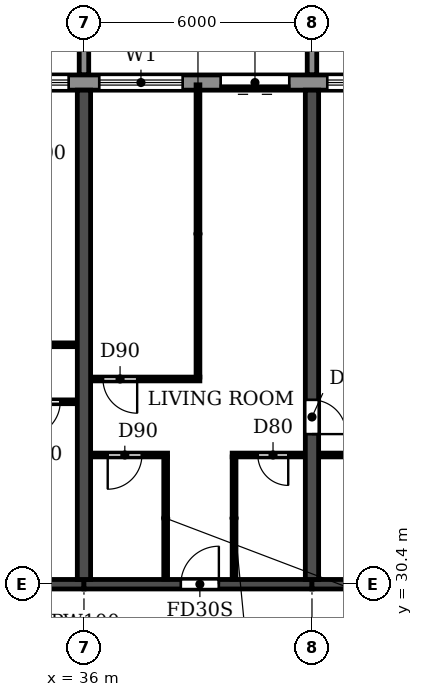
"""IFC4 building model, lengths in metres.
Left out: names, types, materials, properties, quantities, classifications, styles, units other than length and angle.
Written with IfcOpenShell. Run it as: python <this file> out.ifc"""

import sys

from ifc_helpers import new_model, si_unit, direction, frame, frame_2d, origin, place, context, subcontext, project, spatial, polyline, rectangle, outline, extrude, source, transform, mapped, element, fill, save


model = new_model("IFC4")
c1 = context("Model", 3, precision=1e-05, world=origin(), true_north=direction((0.0, 1.0)))
c2 = subcontext(c1, "Body", "Model", "MODEL_VIEW")
j1 = project(units=[si_unit("LENGTHUNIT", "METRE"), si_unit("PLANEANGLEUNIT", "RADIAN")], contexts=[c1])
p1 = place(None, origin())
s1 = spatial("IfcSite", under=j1, at=p1, CompositionType="ELEMENT")
p2 = place(p1, origin())
s2 = spatial("IfcBuilding", under=s1, at=p2, CompositionType="ELEMENT")
p3 = place(p2, frame((0.0, 0.0, 82.8)))
s3 = spatial("IfcBuildingStorey", under=s2, at=p3, CompositionType="ELEMENT", Elevation=82.8)
p4 = place(p3, frame((36.0, 30.525, 0.0), z_axis=(0.0, 0.0, 1.0), x_axis=(0.0, 1.0, 0.0)))
e1 = element("IfcWall", 1, at=p4, inside=s3, PredefinedType="SHEAR", context=c2, shape_type="SweptSolid", body=[
    extrude(rectangle(XDim=12.875, YDim=0.35, at=frame_2d((6.438, 0.0))), origin(), (0.0, 0.0, 1.0), 3.06),
])
p5 = place(p3, frame((42.0, 30.525, 0.0), z_axis=(0.0, 0.0, 1.0), x_axis=(0.0, 1.0, 0.0)))
e2 = element("IfcWall", 2, at=p5, inside=s3, PredefinedType="SHEAR", context=c2, shape_type="SweptSolid", body=[
    extrude(rectangle(XDim=12.875, YDim=0.35, at=frame_2d((6.438, 0.0))), origin(), (0.0, 0.0, 1.0), 3.06),
])
p6 = place(p5, frame((3.825, 0.0, 0.0)))
e3 = element("IfcOpeningElement", 3, at=p6, cuts=e2, PredefinedType="OPENING", context=c2, shape_type="SweptSolid", body=[
    extrude(rectangle(XDim=0.9, YDim=2.1, at=frame_2d((0.45, 1.05))), frame((0.0, 0.185, 0.0), z_axis=(0.0, -1.0, 0.0), x_axis=(1.0, 0.0, 0.0)), (0.0, 0.0, 1.0), 0.37),
])
p7 = place(p3, frame((30.0, 30.4, 0.0), z_axis=(0.0, 0.0, 1.0), x_axis=(1.0, 0.0, 0.0)))
e4 = element("IfcWall", 4, at=p7, inside=s3, PredefinedType="SHEAR", context=c2, shape_type="SweptSolid", body=[
    extrude(rectangle(XDim=6.0, YDim=0.25, at=frame_2d((3.0, 0.0))), origin(), (0.0, 0.0, 1.0), 2.46),
])
p8 = place(p7, frame((2.45, 0.0, 0.0)))
e5 = element("IfcOpeningElement", 5, at=p8, cuts=e4, PredefinedType="OPENING", context=c2, shape_type="SweptSolid", body=[
    extrude(rectangle(XDim=1.0, YDim=2.1, at=frame_2d((0.5, 1.05))), frame((0.0, 0.135, 0.0), z_axis=(0.0, -1.0, 0.0), x_axis=(1.0, 0.0, 0.0)), (0.0, 0.0, 1.0), 0.27),
])
p9 = place(p3, frame((36.0, 30.4, 0.0), z_axis=(0.0, 0.0, 1.0), x_axis=(1.0, 0.0, 0.0)))
e6 = element("IfcWall", 6, at=p9, inside=s3, PredefinedType="SHEAR", context=c2, shape_type="SweptSolid", body=[
    extrude(rectangle(XDim=6.0, YDim=0.25, at=frame_2d((3.0, 0.0))), origin(), (0.0, 0.0, 1.0), 2.46),
])
p10 = place(p9, frame((2.55, 0.0, 0.0)))
e7 = element("IfcOpeningElement", 7, at=p10, cuts=e6, PredefinedType="OPENING", context=c2, shape_type="SweptSolid", body=[
    extrude(rectangle(XDim=1.0, YDim=2.1, at=frame_2d((0.5, 1.05))), frame((0.0, 0.135, 0.0), z_axis=(0.0, -1.0, 0.0), x_axis=(1.0, 0.0, 0.0)), (0.0, 0.0, 1.0), 0.27),
])
p11 = place(p3, frame((42.0, 30.4, 0.0), z_axis=(0.0, 0.0, 1.0), x_axis=(1.0, 0.0, 0.0)))
e8 = element("IfcWall", 8, at=p11, inside=s3, PredefinedType="SHEAR", context=c2, shape_type="SweptSolid", body=[
    extrude(rectangle(XDim=6.0, YDim=0.25, at=frame_2d((3.0, 0.0))), origin(), (0.0, 0.0, 1.0), 2.46),
])
p12 = place(p3, frame((91.317, 43.6, 0.0), z_axis=(0.0, 0.0, 1.0), x_axis=(-1.0, 0.0, 0.0)))
e9 = element("IfcWall", 9, at=p12, inside=s3, PredefinedType="STANDARD", context=c2, shape_type="SweptSolid", body=[
    extrude(rectangle(XDim=80.634, YDim=0.4, at=frame_2d((40.317, 0.0))), origin(), (0.0, 0.0, 1.0), 3.06),
])
p13 = place(p12, frame((76.717, 0.0, 0.9)))
e10 = element("IfcOpeningElement", 10, at=p13, cuts=e9, PredefinedType="OPENING", context=c2, shape_type="SweptSolid", body=[
    extrude(rectangle(XDim=2.2, YDim=1.5, at=frame_2d((1.1, 0.75))), frame((0.0, 0.21, 0.0), z_axis=(0.0, -1.0, 0.0), x_axis=(1.0, 0.0, 0.0)), (0.0, 0.0, 1.0), 0.42),
])
p14 = place(p12, frame((73.917, 0.0, 0.0)))
e11 = element("IfcOpeningElement", 11, at=p14, cuts=e9, PredefinedType="OPENING", context=c2, shape_type="SweptSolid", body=[
    extrude(rectangle(XDim=1.8, YDim=2.4, at=frame_2d((0.9, 1.2))), frame((0.0, 0.21, 0.0), z_axis=(0.0, -1.0, 0.0), x_axis=(1.0, 0.0, 0.0)), (0.0, 0.0, 1.0), 0.42),
])
p15 = place(p12, frame((70.717, 0.0, 0.9)))
e12 = element("IfcOpeningElement", 12, at=p15, cuts=e9, PredefinedType="OPENING", context=c2, shape_type="SweptSolid", body=[
    extrude(rectangle(XDim=2.2, YDim=1.5, at=frame_2d((1.1, 0.75))), frame((0.0, 0.21, 0.0), z_axis=(0.0, -1.0, 0.0), x_axis=(1.0, 0.0, 0.0)), (0.0, 0.0, 1.0), 0.42),
])
p16 = place(p12, frame((67.717, 0.0, 0.9)))
e13 = element("IfcOpeningElement", 13, at=p16, cuts=e9, PredefinedType="OPENING", context=c2, shape_type="SweptSolid", body=[
    extrude(rectangle(XDim=2.2, YDim=1.5, at=frame_2d((1.1, 0.75))), frame((0.0, 0.21, 0.0), z_axis=(0.0, -1.0, 0.0), x_axis=(1.0, 0.0, 0.0)), (0.0, 0.0, 1.0), 0.42),
])
p17 = place(p12, frame((64.717, 0.0, 0.9)))
e14 = element("IfcOpeningElement", 14, at=p17, cuts=e9, PredefinedType="OPENING", context=c2, shape_type="SweptSolid", body=[
    extrude(rectangle(XDim=2.2, YDim=1.5, at=frame_2d((1.1, 0.75))), frame((0.0, 0.21, 0.0), z_axis=(0.0, -1.0, 0.0), x_axis=(1.0, 0.0, 0.0)), (0.0, 0.0, 1.0), 0.42),
])
p18 = place(p12, frame((61.917, 0.0, 0.0)))
e15 = element("IfcOpeningElement", 15, at=p18, cuts=e9, PredefinedType="OPENING", context=c2, shape_type="SweptSolid", body=[
    extrude(rectangle(XDim=1.8, YDim=2.4, at=frame_2d((0.9, 1.2))), frame((0.0, 0.21, 0.0), z_axis=(0.0, -1.0, 0.0), x_axis=(1.0, 0.0, 0.0)), (0.0, 0.0, 1.0), 0.42),
])
p19 = place(p12, frame((58.917, 0.0, 0.0)))
e16 = element("IfcOpeningElement", 16, at=p19, cuts=e9, PredefinedType="OPENING", context=c2, shape_type="SweptSolid", body=[
    extrude(rectangle(XDim=1.8, YDim=2.4, at=frame_2d((0.9, 1.2))), frame((0.0, 0.21, 0.0), z_axis=(0.0, -1.0, 0.0), x_axis=(1.0, 0.0, 0.0)), (0.0, 0.0, 1.0), 0.42),
])
p20 = place(p12, frame((55.717, 0.0, 0.9)))
e17 = element("IfcOpeningElement", 17, at=p20, cuts=e9, PredefinedType="OPENING", context=c2, shape_type="SweptSolid", body=[
    extrude(rectangle(XDim=2.2, YDim=1.5, at=frame_2d((1.1, 0.75))), frame((0.0, 0.21, 0.0), z_axis=(0.0, -1.0, 0.0), x_axis=(1.0, 0.0, 0.0)), (0.0, 0.0, 1.0), 0.42),
])
p21 = place(p12, frame((52.717, 0.0, 0.9)))
e18 = element("IfcOpeningElement", 18, at=p21, cuts=e9, PredefinedType="OPENING", context=c2, shape_type="SweptSolid", body=[
    extrude(rectangle(XDim=2.2, YDim=1.5, at=frame_2d((1.1, 0.75))), frame((0.0, 0.21, 0.0), z_axis=(0.0, -1.0, 0.0), x_axis=(1.0, 0.0, 0.0)), (0.0, 0.0, 1.0), 0.42),
])
p22 = place(p12, frame((49.917, 0.0, 0.0)))
e19 = element("IfcOpeningElement", 19, at=p22, cuts=e9, PredefinedType="OPENING", context=c2, shape_type="SweptSolid", body=[
    extrude(rectangle(XDim=1.8, YDim=2.4, at=frame_2d((0.9, 1.2))), frame((0.0, 0.21, 0.0), z_axis=(0.0, -1.0, 0.0), x_axis=(1.0, 0.0, 0.0)), (0.0, 0.0, 1.0), 0.42),
])
p23 = place(p12, frame((46.717, 0.0, 0.9)))
e20 = element("IfcOpeningElement", 20, at=p23, cuts=e9, PredefinedType="OPENING", context=c2, shape_type="SweptSolid", body=[
    extrude(rectangle(XDim=2.2, YDim=1.5, at=frame_2d((1.1, 0.75))), frame((0.0, 0.21, 0.0), z_axis=(0.0, -1.0, 0.0), x_axis=(1.0, 0.0, 0.0)), (0.0, 0.0, 1.0), 0.42),
])
p24 = place(p12, frame((43.717, 0.0, 0.9)))
e21 = element("IfcOpeningElement", 21, at=p24, cuts=e9, PredefinedType="OPENING", context=c2, shape_type="SweptSolid", body=[
    extrude(rectangle(XDim=2.2, YDim=1.5, at=frame_2d((1.1, 0.75))), frame((0.0, 0.21, 0.0), z_axis=(0.0, -1.0, 0.0), x_axis=(1.0, 0.0, 0.0)), (0.0, 0.0, 1.0), 0.42),
])
p25 = place(p12, frame((40.717, 0.0, 0.9)))
e22 = element("IfcOpeningElement", 22, at=p25, cuts=e9, PredefinedType="OPENING", context=c2, shape_type="SweptSolid", body=[
    extrude(rectangle(XDim=2.2, YDim=1.5, at=frame_2d((1.1, 0.75))), frame((0.0, 0.21, 0.0), z_axis=(0.0, -1.0, 0.0), x_axis=(1.0, 0.0, 0.0)), (0.0, 0.0, 1.0), 0.42),
])
p26 = place(p12, frame((37.917, 0.0, 0.0)))
e23 = element("IfcOpeningElement", 23, at=p26, cuts=e9, PredefinedType="OPENING", context=c2, shape_type="SweptSolid", body=[
    extrude(rectangle(XDim=1.8, YDim=2.4, at=frame_2d((0.9, 1.2))), frame((0.0, 0.21, 0.0), z_axis=(0.0, -1.0, 0.0), x_axis=(1.0, 0.0, 0.0)), (0.0, 0.0, 1.0), 0.42),
])
p27 = place(p12, frame((34.717, 0.0, 0.9)))
e24 = element("IfcOpeningElement", 24, at=p27, cuts=e9, PredefinedType="OPENING", context=c2, shape_type="SweptSolid", body=[
    extrude(rectangle(XDim=2.2, YDim=1.5, at=frame_2d((1.1, 0.75))), frame((0.0, 0.21, 0.0), z_axis=(0.0, -1.0, 0.0), x_axis=(1.0, 0.0, 0.0)), (0.0, 0.0, 1.0), 0.42),
])
p28 = place(p12, frame((31.717, 0.0, 0.9)))
e25 = element("IfcOpeningElement", 25, at=p28, cuts=e9, PredefinedType="OPENING", context=c2, shape_type="SweptSolid", body=[
    extrude(rectangle(XDim=2.2, YDim=1.5, at=frame_2d((1.1, 0.75))), frame((0.0, 0.21, 0.0), z_axis=(0.0, -1.0, 0.0), x_axis=(1.0, 0.0, 0.0)), (0.0, 0.0, 1.0), 0.42),
])
p29 = place(p12, frame((28.917, 0.0, 0.0)))
e26 = element("IfcOpeningElement", 26, at=p29, cuts=e9, PredefinedType="OPENING", context=c2, shape_type="SweptSolid", body=[
    extrude(rectangle(XDim=1.8, YDim=2.4, at=frame_2d((0.9, 1.2))), frame((0.0, 0.21, 0.0), z_axis=(0.0, -1.0, 0.0), x_axis=(1.0, 0.0, 0.0)), (0.0, 0.0, 1.0), 0.42),
])
p30 = place(p12, frame((25.717, 0.0, 0.9)))
e27 = element("IfcOpeningElement", 27, at=p30, cuts=e9, PredefinedType="OPENING", context=c2, shape_type="SweptSolid", body=[
    extrude(rectangle(XDim=2.2, YDim=1.5, at=frame_2d((1.1, 0.75))), frame((0.0, 0.21, 0.0), z_axis=(0.0, -1.0, 0.0), x_axis=(1.0, 0.0, 0.0)), (0.0, 0.0, 1.0), 0.42),
])
p31 = place(p12, frame((22.717, 0.0, 0.9)))
e28 = element("IfcOpeningElement", 28, at=p31, cuts=e9, PredefinedType="OPENING", context=c2, shape_type="SweptSolid", body=[
    extrude(rectangle(XDim=2.2, YDim=1.5, at=frame_2d((1.1, 0.75))), frame((0.0, 0.21, 0.0), z_axis=(0.0, -1.0, 0.0), x_axis=(1.0, 0.0, 0.0)), (0.0, 0.0, 1.0), 0.42),
])
p32 = place(p12, frame((19.717, 0.0, 0.9)))
e29 = element("IfcOpeningElement", 29, at=p32, cuts=e9, PredefinedType="OPENING", context=c2, shape_type="SweptSolid", body=[
    extrude(rectangle(XDim=2.2, YDim=1.5, at=frame_2d((1.1, 0.75))), frame((0.0, 0.21, 0.0), z_axis=(0.0, -1.0, 0.0), x_axis=(1.0, 0.0, 0.0)), (0.0, 0.0, 1.0), 0.42),
])
p33 = place(p12, frame((16.717, 0.0, 0.9)))
e30 = element("IfcOpeningElement", 30, at=p33, cuts=e9, PredefinedType="OPENING", context=c2, shape_type="SweptSolid", body=[
    extrude(rectangle(XDim=2.2, YDim=1.5, at=frame_2d((1.1, 0.75))), frame((0.0, 0.21, 0.0), z_axis=(0.0, -1.0, 0.0), x_axis=(1.0, 0.0, 0.0)), (0.0, 0.0, 1.0), 0.42),
])
p34 = place(p12, frame((13.917, 0.0, 0.0)))
e31 = element("IfcOpeningElement", 31, at=p34, cuts=e9, PredefinedType="OPENING", context=c2, shape_type="SweptSolid", body=[
    extrude(rectangle(XDim=1.8, YDim=2.4, at=frame_2d((0.9, 1.2))), frame((0.0, 0.21, 0.0), z_axis=(0.0, -1.0, 0.0), x_axis=(1.0, 0.0, 0.0)), (0.0, 0.0, 1.0), 0.42),
])
p35 = place(p12, frame((10.717, 0.0, 0.9)))
e32 = element("IfcOpeningElement", 32, at=p35, cuts=e9, PredefinedType="OPENING", context=c2, shape_type="SweptSolid", body=[
    extrude(rectangle(XDim=2.2, YDim=1.5, at=frame_2d((1.1, 0.75))), frame((0.0, 0.21, 0.0), z_axis=(0.0, -1.0, 0.0), x_axis=(1.0, 0.0, 0.0)), (0.0, 0.0, 1.0), 0.42),
])
p36 = place(p12, frame((7.717, 0.0, 0.9)))
e33 = element("IfcOpeningElement", 33, at=p36, cuts=e9, PredefinedType="OPENING", context=c2, shape_type="SweptSolid", body=[
    extrude(rectangle(XDim=2.2, YDim=1.5, at=frame_2d((1.1, 0.75))), frame((0.0, 0.21, 0.0), z_axis=(0.0, -1.0, 0.0), x_axis=(1.0, 0.0, 0.0)), (0.0, 0.0, 1.0), 0.42),
])
p37 = place(p12, frame((4.917, 0.0, 0.0)))
e34 = element("IfcOpeningElement", 34, at=p37, cuts=e9, PredefinedType="OPENING", context=c2, shape_type="SweptSolid", body=[
    extrude(rectangle(XDim=1.8, YDim=2.4, at=frame_2d((0.9, 1.2))), frame((0.0, 0.21, 0.0), z_axis=(0.0, -1.0, 0.0), x_axis=(1.0, 0.0, 0.0)), (0.0, 0.0, 1.0), 0.42),
])
p38 = place(p12, frame((1.717, 0.0, 0.9)))
e35 = element("IfcOpeningElement", 35, at=p38, cuts=e9, PredefinedType="OPENING", context=c2, shape_type="SweptSolid", body=[
    extrude(rectangle(XDim=2.2, YDim=1.5, at=frame_2d((1.1, 0.75))), frame((0.0, 0.21, 0.0), z_axis=(0.0, -1.0, 0.0), x_axis=(1.0, 0.0, 0.0)), (0.0, 0.0, 1.0), 0.42),
])
m1 = source(origin(), c2, "Body", "SweptSolid", [
    extrude(outline(polyline([(0.0, 0.0), (0.25, 0.0), (0.25, 3.1), (0.0, 3.1), (0.0, 0.0)])), origin(), (0.0, 0.0, 1.0), 3.1),
])
for number, where in (
    (36, (35.875, 43.8, 0.0)),
    (37, (41.875, 43.8, 0.0)),
):
    element("IfcWall", number, at=place(p3, frame(where)), inside=s3, PredefinedType="STANDARD", context=c2, shape_type="MappedRepresentation", body=[
        mapped(m1, transform((0.0, 0.0, 0.0))),
    ])
p39 = place(p3, frame((36.185, 33.8, 0.0), z_axis=(0.0, 0.0, 1.0), x_axis=(1.0, 0.0, 0.0)))
e38 = element("IfcWall", 38, at=p39, inside=s3, PredefinedType="PARTITIONING", context=c2, shape_type="SweptSolid", body=[
    extrude(rectangle(XDim=2.015, YDim=0.1, at=frame_2d((1.007, 0.0))), origin(), (0.0, 0.0, 1.0), 3.06),
])
p40 = place(p39, frame((0.44, 0.0, 0.0)))
e39 = element("IfcOpeningElement", 39, at=p40, cuts=e38, PredefinedType="OPENING", context=c2, shape_type="SweptSolid", body=[
    extrude(rectangle(XDim=0.9, YDim=2.1, at=frame_2d((0.45, 1.05))), frame((0.0, 0.06, 0.0), z_axis=(0.0, -1.0, 0.0), x_axis=(1.0, 0.0, 0.0)), (0.0, 0.0, 1.0), 0.12),
])
p41 = place(p3, frame((39.9, 33.8, 0.0), z_axis=(0.0, 0.0, 1.0), x_axis=(1.0, 0.0, 0.0)))
e40 = element("IfcWall", 40, at=p41, inside=s3, PredefinedType="PARTITIONING", context=c2, shape_type="SweptSolid", body=[
    extrude(rectangle(XDim=1.915, YDim=0.1, at=frame_2d((0.958, 0.0))), origin(), (0.0, 0.0, 1.0), 3.06),
])
p42 = place(p41, frame((0.675, 0.0, 0.0)))
e41 = element("IfcOpeningElement", 41, at=p42, cuts=e40, PredefinedType="OPENING", context=c2, shape_type="SweptSolid", body=[
    extrude(rectangle(XDim=0.8, YDim=2.1, at=frame_2d((0.4, 1.05))), frame((0.0, 0.06, 0.0), z_axis=(0.0, -1.0, 0.0), x_axis=(1.0, 0.0, 0.0)), (0.0, 0.0, 1.0), 0.12),
])
p43 = place(p3, frame((42.185, 33.8, 0.0), z_axis=(0.0, 0.0, 1.0), x_axis=(1.0, 0.0, 0.0)))
e42 = element("IfcWall", 42, at=p43, inside=s3, PredefinedType="PARTITIONING", context=c2, shape_type="SweptSolid", body=[
    extrude(rectangle(XDim=2.715, YDim=0.1, at=frame_2d((1.357, 0.0))), origin(), (0.0, 0.0, 1.0), 3.06),
])
p44 = place(p43, frame((0.915, 0.0, 0.0)))
e43 = element("IfcOpeningElement", 43, at=p44, cuts=e42, PredefinedType="OPENING", context=c2, shape_type="SweptSolid", body=[
    extrude(rectangle(XDim=0.8, YDim=2.1, at=frame_2d((0.4, 1.05))), frame((0.0, 0.06, 0.0), z_axis=(0.0, -1.0, 0.0), x_axis=(1.0, 0.0, 0.0)), (0.0, 0.0, 1.0), 0.12),
])
p45 = place(p3, frame((33.8, 35.2, 0.0), z_axis=(0.0, 0.0, 1.0), x_axis=(1.0, 0.0, 0.0)))
e44 = element("IfcWall", 44, at=p45, inside=s3, PredefinedType="PARTITIONING", context=c2, shape_type="SweptSolid", body=[
    extrude(rectangle(XDim=2.015, YDim=0.1, at=frame_2d((1.007, 0.0))), origin(), (0.0, 0.0, 1.0), 3.06),
])
p46 = place(p45, frame((0.675, 0.0, 0.0)))
e45 = element("IfcOpeningElement", 45, at=p46, cuts=e44, PredefinedType="OPENING", context=c2, shape_type="SweptSolid", body=[
    extrude(rectangle(XDim=0.9, YDim=2.1, at=frame_2d((0.45, 1.05))), frame((0.0, 0.06, 0.0), z_axis=(0.0, -1.0, 0.0), x_axis=(1.0, 0.0, 0.0)), (0.0, 0.0, 1.0), 0.12),
])
p47 = place(p3, frame((36.185, 35.8, 0.0), z_axis=(0.0, 0.0, 1.0), x_axis=(1.0, 0.0, 0.0)))
e46 = element("IfcWall", 46, at=p47, inside=s3, PredefinedType="PARTITIONING", context=c2, shape_type="SweptSolid", body=[
    extrude(rectangle(XDim=2.865, YDim=0.1, at=frame_2d((1.433, 0.0))), origin(), (0.0, 0.0, 1.0), 3.06),
])
p48 = place(p47, frame((0.315, 0.0, 0.0)))
e47 = element("IfcOpeningElement", 47, at=p48, cuts=e46, PredefinedType="OPENING", context=c2, shape_type="SweptSolid", body=[
    extrude(rectangle(XDim=0.9, YDim=2.1, at=frame_2d((0.45, 1.05))), frame((0.0, 0.06, 0.0), z_axis=(0.0, -1.0, 0.0), x_axis=(1.0, 0.0, 0.0)), (0.0, 0.0, 1.0), 0.12),
])
p49 = place(p3, frame((32.95, 36.7, 0.0), z_axis=(0.0, 0.0, 1.0), x_axis=(1.0, 0.0, 0.0)))
e48 = element("IfcWall", 48, at=p49, inside=s3, PredefinedType="PARTITIONING", context=c2, shape_type="SweptSolid", body=[
    extrude(rectangle(XDim=2.865, YDim=0.1, at=frame_2d((1.433, 0.0))), origin(), (0.0, 0.0, 1.0), 3.06),
])
p50 = place(p49, frame((0.55, 0.0, 0.0)))
e49 = element("IfcOpeningElement", 49, at=p50, cuts=e48, PredefinedType="OPENING", context=c2, shape_type="SweptSolid", body=[
    extrude(rectangle(XDim=0.9, YDim=2.1, at=frame_2d((0.45, 1.05))), frame((0.0, 0.06, 0.0), z_axis=(0.0, -1.0, 0.0), x_axis=(1.0, 0.0, 0.0)), (0.0, 0.0, 1.0), 0.12),
])
p51 = place(p3, frame((38.15, 30.535, 0.0), z_axis=(0.0, 0.0, 1.0), x_axis=(0.0, 1.0, 0.0)))
e50 = element("IfcWall", 50, at=p51, inside=s3, PredefinedType="PARTITIONING", context=c2, shape_type="SweptSolid", body=[
    extrude(rectangle(XDim=3.215, YDim=0.1, at=frame_2d((1.607, 0.0))), origin(), (0.0, 0.0, 1.0), 3.06),
])
p52 = place(p3, frame((39.0, 35.85, 0.0), z_axis=(0.0, 0.0, 1.0), x_axis=(0.0, 1.0, 0.0)))
e51 = element("IfcWall", 51, at=p52, inside=s3, PredefinedType="PARTITIONING", context=c2, shape_type="SweptSolid", body=[
    extrude(rectangle(XDim=7.69, YDim=0.1, at=frame_2d((3.845, 0.0))), origin(), (0.0, 0.0, 1.0), 3.06),
])
p53 = place(p3, frame((39.95, 30.535, 0.0), z_axis=(0.0, 0.0, 1.0), x_axis=(0.0, 1.0, 0.0)))
e52 = element("IfcWall", 52, at=p53, inside=s3, PredefinedType="PARTITIONING", context=c2, shape_type="SweptSolid", body=[
    extrude(rectangle(XDim=3.215, YDim=0.1, at=frame_2d((1.607, 0.0))), origin(), (0.0, 0.0, 1.0), 3.06),
])
p54 = place(p20, origin())
e53 = element("IfcWindow", 53, at=p54, inside=s3, PartitioningType="DOUBLE_PANEL_HORIZONTAL", PredefinedType="WINDOW", context=c2, shape_type="SweptSolid", body=[
    extrude(rectangle(XDim=2.2, YDim=1.5, at=frame_2d((1.1, 0.75))), frame((0.0, 0.03, 0.0), z_axis=(0.0, -1.0, 0.0), x_axis=(1.0, 0.0, 0.0)), (0.0, 0.0, 1.0), 0.06),
])
fill(e17, e53)
p55 = place(p21, origin())
e54 = element("IfcWindow", 54, at=p55, inside=s3, PartitioningType="DOUBLE_PANEL_HORIZONTAL", PredefinedType="WINDOW", context=c2, shape_type="SweptSolid", body=[
    extrude(rectangle(XDim=2.2, YDim=1.5, at=frame_2d((1.1, 0.75))), frame((0.0, 0.03, 0.0), z_axis=(0.0, -1.0, 0.0), x_axis=(1.0, 0.0, 0.0)), (0.0, 0.0, 1.0), 0.06),
])
fill(e18, e54)
p56 = place(p22, origin())
e55 = element("IfcDoor", 55, at=p56, inside=s3, OperationType="DOUBLE_DOOR_SLIDING", PredefinedType="DOOR", context=c2, shape_type="SweptSolid", body=[
    extrude(rectangle(XDim=1.8, YDim=2.4, at=frame_2d((0.9, 1.2))), frame((0.0, 0.025, 0.0), z_axis=(0.0, -1.0, 0.0), x_axis=(1.0, 0.0, 0.0)), (0.0, 0.0, 1.0), 0.05),
])
fill(e19, e55)
p57 = place(p23, origin())
e56 = element("IfcWindow", 56, at=p57, inside=s3, PartitioningType="DOUBLE_PANEL_HORIZONTAL", PredefinedType="WINDOW", context=c2, shape_type="SweptSolid", body=[
    extrude(rectangle(XDim=2.2, YDim=1.5, at=frame_2d((1.1, 0.75))), frame((0.0, 0.03, 0.0), z_axis=(0.0, -1.0, 0.0), x_axis=(1.0, 0.0, 0.0)), (0.0, 0.0, 1.0), 0.06),
])
fill(e20, e56)
p58 = place(p46, frame((0.9, 0.0, 0.0), z_axis=(0.0, 0.0, 1.0), x_axis=(-1.0, 0.0, 0.0)))
e57 = element("IfcDoor", 57, at=p58, inside=s3, OperationType="SINGLE_SWING_RIGHT", PredefinedType="DOOR", context=c2, shape_type="SweptSolid", body=[
    extrude(rectangle(XDim=0.9, YDim=2.1, at=frame_2d((0.45, 1.05))), frame((0.0, 0.025, 0.0), z_axis=(0.0, -1.0, 0.0), x_axis=(1.0, 0.0, 0.0)), (0.0, 0.0, 1.0), 0.05),
])
fill(e45, e57)
p59 = place(p48, frame((0.9, 0.0, 0.0), z_axis=(0.0, 0.0, 1.0), x_axis=(-1.0, 0.0, 0.0)))
e58 = element("IfcDoor", 58, at=p59, inside=s3, OperationType="SINGLE_SWING_LEFT", PredefinedType="DOOR", context=c2, shape_type="SweptSolid", body=[
    extrude(rectangle(XDim=0.9, YDim=2.1, at=frame_2d((0.45, 1.05))), frame((0.0, 0.025, 0.0), z_axis=(0.0, -1.0, 0.0), x_axis=(1.0, 0.0, 0.0)), (0.0, 0.0, 1.0), 0.05),
])
fill(e47, e58)
p60 = place(p40, frame((0.9, 0.0, 0.0), z_axis=(0.0, 0.0, 1.0), x_axis=(-1.0, 0.0, 0.0)))
e59 = element("IfcDoor", 59, at=p60, inside=s3, OperationType="SINGLE_SWING_RIGHT", PredefinedType="DOOR", context=c2, shape_type="SweptSolid", body=[
    extrude(rectangle(XDim=0.9, YDim=2.1, at=frame_2d((0.45, 1.05))), frame((0.0, 0.025, 0.0), z_axis=(0.0, -1.0, 0.0), x_axis=(1.0, 0.0, 0.0)), (0.0, 0.0, 1.0), 0.05),
])
fill(e39, e59)
p61 = place(p10, origin())
e60 = element("IfcDoor", 60, at=p61, inside=s3, OperationType="SINGLE_SWING_RIGHT", PredefinedType="DOOR", context=c2, shape_type="SweptSolid", body=[
    extrude(rectangle(XDim=1.0, YDim=2.1, at=frame_2d((0.5, 1.05))), frame((0.0, 0.025, 0.0), z_axis=(0.0, -1.0, 0.0), x_axis=(1.0, 0.0, 0.0)), (0.0, 0.0, 1.0), 0.05),
])
fill(e7, e60)
p62 = place(p42, frame((0.8, 0.0, 0.0), z_axis=(0.0, 0.0, 1.0), x_axis=(-1.0, 0.0, 0.0)))
e61 = element("IfcDoor", 61, at=p62, inside=s3, OperationType="SINGLE_SWING_LEFT", PredefinedType="DOOR", context=c2, shape_type="SweptSolid", body=[
    extrude(rectangle(XDim=0.8, YDim=2.1, at=frame_2d((0.4, 1.05))), frame((0.0, 0.025, 0.0), z_axis=(0.0, -1.0, 0.0), x_axis=(1.0, 0.0, 0.0)), (0.0, 0.0, 1.0), 0.05),
])
fill(e41, e61)
p63 = place(p6, frame((0.9, 0.0, 0.0), z_axis=(0.0, 0.0, 1.0), x_axis=(-1.0, 0.0, 0.0)))
e62 = element("IfcDoor", 62, at=p63, inside=s3, OperationType="SINGLE_SWING_RIGHT", PredefinedType="DOOR", context=c2, shape_type="SweptSolid", body=[
    extrude(rectangle(XDim=0.9, YDim=2.1, at=frame_2d((0.45, 1.05))), frame((0.0, 0.025, 0.0), z_axis=(0.0, -1.0, 0.0), x_axis=(1.0, 0.0, 0.0)), (0.0, 0.0, 1.0), 0.05),
])
fill(e3, e62)
save(model, sys.argv[1])
